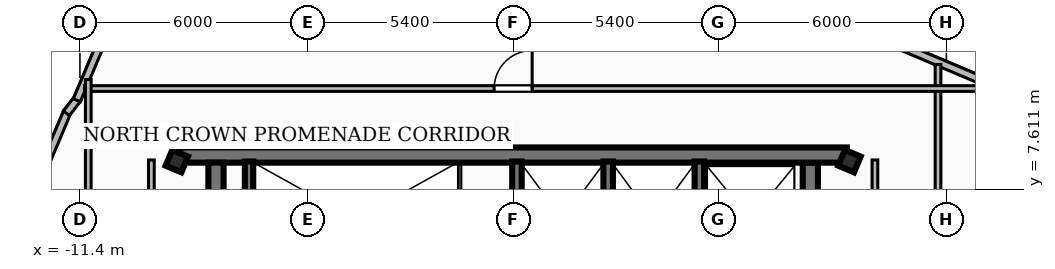
"""IFC4 building model, lengths in metres.
Left out: names, types, materials, properties, quantities, classifications, styles, units other than length and angle.
Written with IfcOpenShell. Run it as: python <this file> out.ifc"""

import sys

from ifc_helpers import new_model, si_unit, direction, frame, frame_2d, origin, origin_2d, place, context, subcontext, project, spatial, rectangle, hollow_rectangle, extrude, element, fill, save


model = new_model("IFC4")
c1 = context("Model", 3, precision=1e-05, world=origin(), true_north=direction((0.0, 1.0)))
c2 = subcontext(c1, "Body", "Model", "MODEL_VIEW")
j1 = project(units=[si_unit("LENGTHUNIT", "METRE"), si_unit("PLANEANGLEUNIT", "RADIAN")], contexts=[c1])
p1 = place(None, origin())
s1 = spatial("IfcSite", under=j1, at=p1, CompositionType="ELEMENT")
p2 = place(p1, origin())
s2 = spatial("IfcBuilding", under=s1, at=p2, CompositionType="ELEMENT")
p3 = place(p2, frame((0.0, 0.0, 301.68)))
s3 = spatial("IfcBuildingStorey", under=s2, at=p3, CompositionType="ELEMENT", Elevation=301.68)
p4 = place(p3, frame((-8.78, 8.51, 0.0), z_axis=(0.0, 0.0, 1.0), x_axis=(1.0, 0.0, 0.0)))
e1 = element("IfcWall", 1, at=p4, inside=s3, PredefinedType="SHEAR", context=c2, shape_type="SweptSolid", body=[
    extrude(rectangle(XDim=17.56, YDim=0.4, at=frame_2d((8.78, 0.0))), origin(), (0.0, 0.0, 1.0), 3.89),
])
for number, where, z_axis, x_axis in (
    (2, (-7.82, 1.95, 0.0), (0.0, 0.0, 1.0), (0.0, 1.0, 0.0)),
    (3, (7.82, 8.31, 0.0), (0.0, 0.0, 1.0), (0.0, -1.0, 0.0)),
):
    element("IfcWall", number, at=place(p3, frame(where, z_axis=z_axis, x_axis=x_axis)), inside=s3, PredefinedType="SHEAR", context=c2, shape_type="SweptSolid", body=[
        extrude(rectangle(XDim=6.36, YDim=0.4, at=frame_2d((3.18, 0.0))), origin(), (0.0, 0.0, 1.0), 3.89),
    ])
p5 = place(p3, frame((-6.95, 5.28, 0.0), z_axis=(0.0, 0.0, 1.0), x_axis=(0.0, 1.0, 0.0)))
e4 = element("IfcWall", 4, at=p5, inside=s3, PredefinedType="SOLIDWALL", context=c2, shape_type="SweptSolid", body=[
    extrude(rectangle(XDim=3.06, YDim=0.22, at=frame_2d((1.53, 0.0))), origin(), (0.0, 0.0, 1.0), 3.89),
])
for number, where, z_axis, x_axis in (
    (5, (0.1, 5.3, 0.0), (0.0, 0.0, 1.0), (0.0, 1.0, 0.0)),
    (6, (2.5, 5.3, 0.0), (0.0, 0.0, 1.0), (0.0, 1.0, 0.0)),
    (7, (4.9, 5.3, 0.0), (0.0, 0.0, 1.0), (0.0, 1.0, 0.0)),
):
    element("IfcWall", number, at=place(p3, frame(where, z_axis=z_axis, x_axis=x_axis)), inside=s3, PredefinedType="SOLIDWALL", context=c2, shape_type="SweptSolid", body=[
        extrude(rectangle(XDim=3.04, YDim=0.25, at=frame_2d((1.52, 0.0))), origin(), (0.0, 0.0, 1.0), 3.89),
    ])
for number, where, z_axis, x_axis in (
    (8, (-8.85, 8.35, 0.0), (0.0, 0.0, 1.0), (0.389, 0.921, 0.0)),
    (9, (8.85, 8.35, 0.0), (0.0, 0.0, 1.0), (0.389, 0.921, 0.0)),
):
    element("IfcColumn", number, at=place(p3, frame(where, z_axis=z_axis, x_axis=x_axis)), inside=s3, PredefinedType="COLUMN", context=c2, shape_type="SweptSolid", body=[
        extrude(hollow_rectangle(XDim=0.45, YDim=0.45, WallThickness=0.022, at=origin_2d()), origin(), (0.0, 0.0, 1.0), 4.14),
    ])
p6 = place(p3, frame((-15.096, 1.693, 0.0), z_axis=(0.0, 0.0, 1.0), x_axis=(0.389467605067, 0.92104016449, 0.0)))
e10 = element("IfcWall", 10, at=p6, inside=s3, PredefinedType="SOLIDWALL", context=c2, shape_type="SweptSolid", body=[
    extrude(rectangle(XDim=8.64, YDim=0.2, at=frame_2d((4.32, 0.0))), origin(), (0.0, 0.0, 1.0), 3.89),
])
p7 = place(p3, frame((-11.756, 9.608, 0.0), z_axis=(0.0, 0.0, 1.0), x_axis=(0.61252495827, 0.79045124802, 0.0)))
e11 = element("IfcWall", 11, at=p7, inside=s3, PredefinedType="SOLIDWALL", context=c2, shape_type="SweptSolid", body=[
    extrude(rectangle(XDim=0.49, YDim=0.2, at=frame_2d((0.245, 0.0))), origin(), (0.0, 0.0, 1.0), 3.89),
])
p8 = place(p3, frame((-11.481, 9.952, 0.0), z_axis=(0.0, 0.0, 1.0), x_axis=(0.389505259475, 0.92102424118, 0.0)))
e12 = element("IfcWall", 12, at=p8, inside=s3, PredefinedType="SOLIDWALL", context=c2, shape_type="SweptSolid", body=[
    extrude(rectangle(XDim=8.867, YDim=0.2, at=frame_2d((4.434, 0.0))), origin(), (0.0, 0.0, 1.0), 3.89),
])
p9 = place(p3, frame((9.7, 11.587, 0.0), z_axis=(0.0, 0.0, 1.0), x_axis=(0.921047594323, -0.389450034011, 0.0)))
e13 = element("IfcWall", 13, at=p9, inside=s3, PredefinedType="SOLIDWALL", context=c2, shape_type="SweptSolid", body=[
    extrude(rectangle(XDim=9.141, YDim=0.2, at=frame_2d((4.57, 0.0))), origin(), (0.0, 0.0, 1.0), 3.89),
])
p10 = place(p3, frame((-9.52, 1.75, 0.0), z_axis=(0.0, 0.0, 1.0), x_axis=(0.0, 1.0, 0.0)))
e14 = element("IfcWall", 14, at=p10, inside=s3, PredefinedType="PARTITIONING", context=c2, shape_type="SweptSolid", body=[
    extrude(rectangle(XDim=6.63, YDim=0.15, at=frame_2d((3.315, 0.0))), origin(), (0.0, 0.0, 1.0), 3.26),
])
p11 = place(p3, frame((9.52, 1.75, 0.0), z_axis=(0.0, 0.0, 1.0), x_axis=(0.0, 1.0, 0.0)))
e15 = element("IfcWall", 15, at=p11, inside=s3, PredefinedType="PARTITIONING", context=c2, shape_type="SweptSolid", body=[
    extrude(rectangle(XDim=6.63, YDim=0.15, at=frame_2d((3.315, 0.0))), origin(), (0.0, 0.0, 1.0), 3.89),
])
p12 = place(p3, frame((11.18, 10.891, 0.0), z_axis=(0.0, 0.0, 1.0), x_axis=(0.0, -1.0, 0.0)))
e16 = element("IfcWall", 16, at=p12, inside=s3, PredefinedType="PARTITIONING", context=c2, shape_type="SweptSolid", body=[
    extrude(rectangle(XDim=21.387, YDim=0.15, at=frame_2d((10.694, 0.0))), origin(), (0.0, 0.0, 1.0), 3.26),
])
p13 = place(p12, frame((10.391, 0.0, 0.0)))
e17 = element("IfcOpeningElement", 17, at=p13, cuts=e16, PredefinedType="OPENING", context=c2, shape_type="SweptSolid", body=[
    extrude(rectangle(XDim=1.0, YDim=2.1, at=frame_2d((0.5, 1.05))), frame((0.0, 0.085, 0.0), z_axis=(0.0, -1.0, 0.0), x_axis=(1.0, 0.0, 0.0)), (0.0, 0.0, 1.0), 0.17),
])
p14 = place(p3, frame((-11.28, 10.26, 0.0), z_axis=(0.0, 0.0, 1.0), x_axis=(1.0, 0.0, 0.0)))
e18 = element("IfcWall", 18, at=p14, inside=s3, PredefinedType="PARTITIONING", context=c2, shape_type="SweptSolid", body=[
    extrude(rectangle(XDim=23.952, YDim=0.15, at=frame_2d((11.976, 0.0))), origin(), (0.0, 0.0, 1.0), 3.26),
])
p15 = place(p14, frame((10.78, 0.0, 0.0)))
e19 = element("IfcOpeningElement", 19, at=p15, cuts=e18, PredefinedType="OPENING", context=c2, shape_type="SweptSolid", body=[
    extrude(rectangle(XDim=1.0, YDim=2.1, at=frame_2d((0.5, 1.05))), frame((0.0, 0.085, 0.0), z_axis=(0.0, -1.0, 0.0), x_axis=(1.0, 0.0, 0.0)), (0.0, 0.0, 1.0), 0.17),
])
p16 = place(p3, frame((-11.18, -10.891, 0.0), z_axis=(0.0, 0.0, 1.0), x_axis=(0.0, 1.0, 0.0)))
e20 = element("IfcWall", 20, at=p16, inside=s3, PredefinedType="PARTITIONING", context=c2, shape_type="SweptSolid", body=[
    extrude(rectangle(XDim=21.387, YDim=0.15, at=frame_2d((10.694, 0.0))), origin(), (0.0, 0.0, 1.0), 3.26),
])
p17 = place(p16, frame((8.791, 0.0, 0.0)))
e21 = element("IfcOpeningElement", 21, at=p17, cuts=e20, PredefinedType="OPENING", context=c2, shape_type="SweptSolid", body=[
    extrude(rectangle(XDim=1.0, YDim=2.1, at=frame_2d((0.5, 1.05))), frame((0.0, 0.085, 0.0), z_axis=(0.0, -1.0, 0.0), x_axis=(1.0, 0.0, 0.0)), (0.0, 0.0, 1.0), 0.17),
])
p18 = place(p15, origin())
e22 = element("IfcDoor", 22, at=p18, inside=s3, OperationType="SINGLE_SWING_RIGHT", PredefinedType="DOOR", context=c2, shape_type="SweptSolid", body=[
    extrude(rectangle(XDim=1.0, YDim=2.1, at=frame_2d((0.5, 1.05))), frame((0.0, 0.025, 0.0), z_axis=(0.0, -1.0, 0.0), x_axis=(1.0, 0.0, 0.0)), (0.0, 0.0, 1.0), 0.05),
])
fill(e19, e22)
save(model, sys.argv[1])
